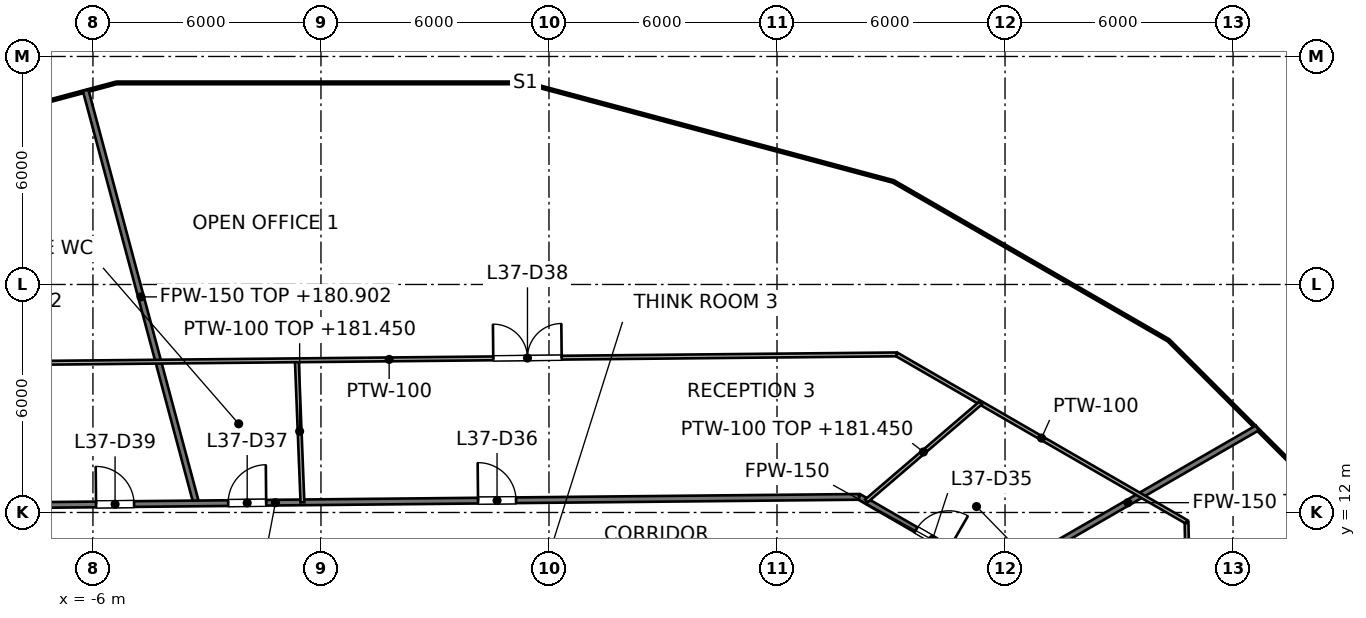
"""IFC4 building model, lengths in metres.
Left out: names, types, materials, properties, quantities, classifications, styles, units other than length and angle.
Written with IfcOpenShell. Run it as: python <this file> out.ifc"""

import sys

from ifc_helpers import new_model, si_unit, direction, frame, frame_2d, origin, place, context, subcontext, project, spatial, rectangle, extrude, element, fill, save


model = new_model("IFC4")
c1 = context("Model", 3, precision=1e-05, world=origin(), true_north=direction((0.0, 1.0)))
c2 = subcontext(c1, "Body", "Model", "MODEL_VIEW")
j1 = project(units=[si_unit("LENGTHUNIT", "METRE"), si_unit("PLANEANGLEUNIT", "RADIAN")], contexts=[c1])
p1 = place(None, origin())
s1 = spatial("IfcSite", under=j1, at=p1, CompositionType="ELEMENT")
p2 = place(p1, origin())
s2 = spatial("IfcBuilding", under=s1, at=p2, CompositionType="ELEMENT")
p3 = place(p2, frame((0.0, 0.0, 177.6)))
s3 = spatial("IfcBuildingStorey", under=s2, at=p3, CompositionType="ELEMENT", Elevation=177.6)
p4 = place(p3, frame((-6.192, 23.108, 0.0), z_axis=(0.0, 0.0, 1.0), x_axis=(0.258761752607, -0.965941175946, 0.0)))
e1 = element("IfcWall", 1, at=p4, inside=s3, PredefinedType="PARTITIONING", context=c2, shape_type="SweptSolid", body=[
    extrude(rectangle(XDim=11.252, YDim=0.15, at=frame_2d((5.626, 0.0))), origin(), (0.0, 0.0, 1.0), 3.302),
])
p5 = place(p3, frame((14.159, 12.412, 0.0), z_axis=(0.0, 0.0, 1.0), x_axis=(0.865837777906, -0.500324836831, 0.0)))
e2 = element("IfcWall", 2, at=p5, inside=s3, PredefinedType="PARTITIONING", context=c2, shape_type="SweptSolid", body=[
    extrude(rectangle(XDim=5.683, YDim=0.15, at=frame_2d((2.841, 0.0))), origin(), (0.0, 0.0, 1.0), 2.995),
])
p6 = place(p5, frame((1.733, 0.0, 0.0)))
e3 = element("IfcOpeningElement", 3, at=p6, cuts=e2, PredefinedType="OPENING", context=c2, shape_type="SweptSolid", body=[
    extrude(rectangle(XDim=1.0, YDim=2.1, at=frame_2d((0.5, 1.05))), frame((0.0, 0.075, 0.0), z_axis=(0.0, -1.0, 0.0), x_axis=(1.0, 0.0, 0.0)), (0.0, 0.0, 1.0), 0.15),
])
p7 = place(p3, frame((-16.555, 12.107, 0.0), z_axis=(0.0, 0.0, 1.0), x_axis=(0.999951034758, 0.009895862121, 0.0)))
e4 = element("IfcWall", 4, at=p7, inside=s3, PredefinedType="PARTITIONING", context=c2, shape_type="SweptSolid", body=[
    extrude(rectangle(XDim=30.715, YDim=0.15, at=frame_2d((15.358, 0.0))), origin(), (0.0, 0.0, 1.0), 2.927),
])
p8 = place(p7, frame((20.689, 0.0, 0.0)))
e5 = element("IfcOpeningElement", 5, at=p8, cuts=e4, PredefinedType="OPENING", context=c2, shape_type="SweptSolid", body=[
    extrude(rectangle(XDim=1.0, YDim=2.1, at=frame_2d((0.5, 1.05))), frame((0.0, 0.075, 0.0), z_axis=(0.0, -1.0, 0.0), x_axis=(1.0, 0.0, 0.0)), (0.0, 0.0, 1.0), 0.15),
])
p9 = place(p7, frame((14.115, 0.0, 0.0)))
e6 = element("IfcOpeningElement", 6, at=p9, cuts=e4, PredefinedType="OPENING", context=c2, shape_type="SweptSolid", body=[
    extrude(rectangle(XDim=1.0, YDim=2.1, at=frame_2d((0.5, 1.05))), frame((0.0, 0.075, 0.0), z_axis=(0.0, -1.0, 0.0), x_axis=(1.0, 0.0, 0.0)), (0.0, 0.0, 1.0), 0.15),
])
p10 = place(p7, frame((10.638, 0.0, 0.0)))
e7 = element("IfcOpeningElement", 7, at=p10, cuts=e4, PredefinedType="OPENING", context=c2, shape_type="SweptSolid", body=[
    extrude(rectangle(XDim=1.0, YDim=2.1, at=frame_2d((0.5, 1.05))), frame((0.0, 0.075, 0.0), z_axis=(0.0, -1.0, 0.0), x_axis=(1.0, 0.0, 0.0)), (0.0, 0.0, 1.0), 0.15),
])
p11 = place(p7, frame((5.176, 0.0, 0.0)))
e8 = element("IfcOpeningElement", 8, at=p11, cuts=e4, PredefinedType="OPENING", context=c2, shape_type="SweptSolid", body=[
    extrude(rectangle(XDim=1.0, YDim=2.1, at=frame_2d((0.5, 1.05))), frame((0.0, 0.075, 0.0), z_axis=(0.0, -1.0, 0.0), x_axis=(1.0, 0.0, 0.0)), (0.0, 0.0, 1.0), 0.15),
])
p12 = place(p3, frame((17.828, 10.293, 0.0), z_axis=(0.0, 0.0, 1.0), x_axis=(0.866042869649, 0.499969747014, 0.0)))
e9 = element("IfcWall", 9, at=p12, inside=s3, PredefinedType="PARTITIONING", context=c2, shape_type="SweptSolid", body=[
    extrude(rectangle(XDim=7.862, YDim=0.15, at=frame_2d((3.931, 0.0))), origin(), (0.0, 0.0, 1.0), 3.076),
])
p13 = place(p3, frame((22.776, 11.754, 0.0), z_axis=(0.0, 0.0, 1.0), x_axis=(0.020565153385, -0.99978851487, 0.0)))
e10 = element("IfcWall", 10, at=p13, inside=s3, PredefinedType="PARTITIONING", context=c2, shape_type="SweptSolid", body=[
    extrude(rectangle(XDim=19.861, YDim=0.1, at=frame_2d((9.931, 0.0))), origin(), (0.0, 0.0, 1.0), 2.927),
])
p14 = place(p13, frame((8.031, 0.0, 0.0)))
e11 = element("IfcOpeningElement", 11, at=p14, cuts=e10, PredefinedType="OPENING", context=c2, shape_type="SweptSolid", body=[
    extrude(rectangle(XDim=1.8, YDim=2.1, at=frame_2d((0.9, 1.05))), frame((0.0, 0.05, 0.0), z_axis=(0.0, -1.0, 0.0), x_axis=(1.0, 0.0, 0.0)), (0.0, 0.0, 1.0), 0.1),
])
p15 = place(p3, frame((-0.635, 16.005, 0.0), z_axis=(0.0, 0.0, 1.0), x_axis=(0.039551001772, -0.999217553018, 0.0)))
e12 = element("IfcWall", 12, at=p15, inside=s3, PredefinedType="PARTITIONING", context=c2, shape_type="SweptSolid", body=[
    extrude(rectangle(XDim=3.741, YDim=0.1, at=frame_2d((1.87, 0.0))), origin(), (0.0, 0.0, 1.0), 3.85),
])
p16 = place(p3, frame((15.144, 16.162, 0.0), z_axis=(0.0, 0.0, 1.0), x_axis=(0.865929062236, -0.500166831342, 0.0)))
e13 = element("IfcWall", 13, at=p16, inside=s3, PredefinedType="PARTITIONING", context=c2, shape_type="SweptSolid", body=[
    extrude(rectangle(XDim=8.813, YDim=0.1, at=frame_2d((4.407, 0.0))), origin(), (0.0, 0.0, 1.0), 2.927),
])
p17 = place(p3, frame((-11.555, 15.897, 0.0), z_axis=(0.0, 0.0, 1.0), x_axis=(0.999951328792, 0.009866105979, 0.0)))
e14 = element("IfcWall", 14, at=p17, inside=s3, PredefinedType="PARTITIONING", context=c2, shape_type="SweptSolid", body=[
    extrude(rectangle(XDim=26.7, YDim=0.1, at=frame_2d((13.35, 0.0))), origin(), (0.0, 0.0, 1.0), 2.927),
])
p18 = place(p17, frame((16.09, 0.0, 0.0)))
e15 = element("IfcOpeningElement", 15, at=p18, cuts=e14, PredefinedType="OPENING", context=c2, shape_type="SweptSolid", body=[
    extrude(rectangle(XDim=1.8, YDim=2.1, at=frame_2d((0.9, 1.05))), frame((0.0, 0.05, 0.0), z_axis=(0.0, -1.0, 0.0), x_axis=(1.0, 0.0, 0.0)), (0.0, 0.0, 1.0), 0.1),
])
p19 = place(p17, frame((3.24, 0.0, 0.0)))
e16 = element("IfcOpeningElement", 16, at=p19, cuts=e14, PredefinedType="OPENING", context=c2, shape_type="SweptSolid", body=[
    extrude(rectangle(XDim=0.9, YDim=2.1, at=frame_2d((0.45, 1.05))), frame((0.0, 0.05, 0.0), z_axis=(0.0, -1.0, 0.0), x_axis=(1.0, 0.0, 0.0)), (0.0, 0.0, 1.0), 0.1),
])
p20 = place(p3, frame((14.349, 12.302, 0.0), z_axis=(0.0, 0.0, 1.0), x_axis=(0.759100106755, 0.650973907253, 0.0)))
e17 = element("IfcWall", 17, at=p20, inside=s3, PredefinedType="PARTITIONING", context=c2, shape_type="SweptSolid", body=[
    extrude(rectangle(XDim=3.965, YDim=0.1, at=frame_2d((1.982, 0.0))), origin(), (0.0, 0.0, 1.0), 3.85),
])
p21 = place(p6, origin())
e18 = element("IfcDoor", 18, at=p21, inside=s3, OperationType="SINGLE_SWING_RIGHT", PredefinedType="DOOR", context=c2, shape_type="SweptSolid", body=[
    extrude(rectangle(XDim=1.0, YDim=2.1, at=frame_2d((0.5, 1.05))), frame((0.0, 0.025, 0.0), z_axis=(0.0, -1.0, 0.0), x_axis=(1.0, 0.0, 0.0)), (0.0, 0.0, 1.0), 0.05),
])
fill(e3, e18)
p22 = place(p8, origin())
e19 = element("IfcDoor", 19, at=p22, inside=s3, OperationType="SINGLE_SWING_LEFT", PredefinedType="DOOR", context=c2, shape_type="SweptSolid", body=[
    extrude(rectangle(XDim=1.0, YDim=2.1, at=frame_2d((0.5, 1.05))), frame((0.0, 0.025, 0.0), z_axis=(0.0, -1.0, 0.0), x_axis=(1.0, 0.0, 0.0)), (0.0, 0.0, 1.0), 0.05),
])
fill(e5, e19)
p23 = place(p9, origin())
e20 = element("IfcDoor", 20, at=p23, inside=s3, OperationType="SINGLE_SWING_RIGHT", PredefinedType="DOOR", context=c2, shape_type="SweptSolid", body=[
    extrude(rectangle(XDim=1.0, YDim=2.1, at=frame_2d((0.5, 1.05))), frame((0.0, 0.025, 0.0), z_axis=(0.0, -1.0, 0.0), x_axis=(1.0, 0.0, 0.0)), (0.0, 0.0, 1.0), 0.05),
])
fill(e6, e20)
p24 = place(p18, origin())
e21 = element("IfcDoor", 21, at=p24, inside=s3, OperationType="DOUBLE_DOOR_SINGLE_SWING", PredefinedType="DOOR", context=c2, shape_type="SweptSolid", body=[
    extrude(rectangle(XDim=1.8, YDim=2.1, at=frame_2d((0.9, 1.05))), frame((0.0, 0.025, 0.0), z_axis=(0.0, -1.0, 0.0), x_axis=(1.0, 0.0, 0.0)), (0.0, 0.0, 1.0), 0.05),
])
fill(e15, e21)
p25 = place(p10, origin())
e22 = element("IfcDoor", 22, at=p25, inside=s3, OperationType="SINGLE_SWING_LEFT", PredefinedType="DOOR", context=c2, shape_type="SweptSolid", body=[
    extrude(rectangle(XDim=1.0, YDim=2.1, at=frame_2d((0.5, 1.05))), frame((0.0, 0.025, 0.0), z_axis=(0.0, -1.0, 0.0), x_axis=(1.0, 0.0, 0.0)), (0.0, 0.0, 1.0), 0.05),
])
fill(e7, e22)
save(model, sys.argv[1])
